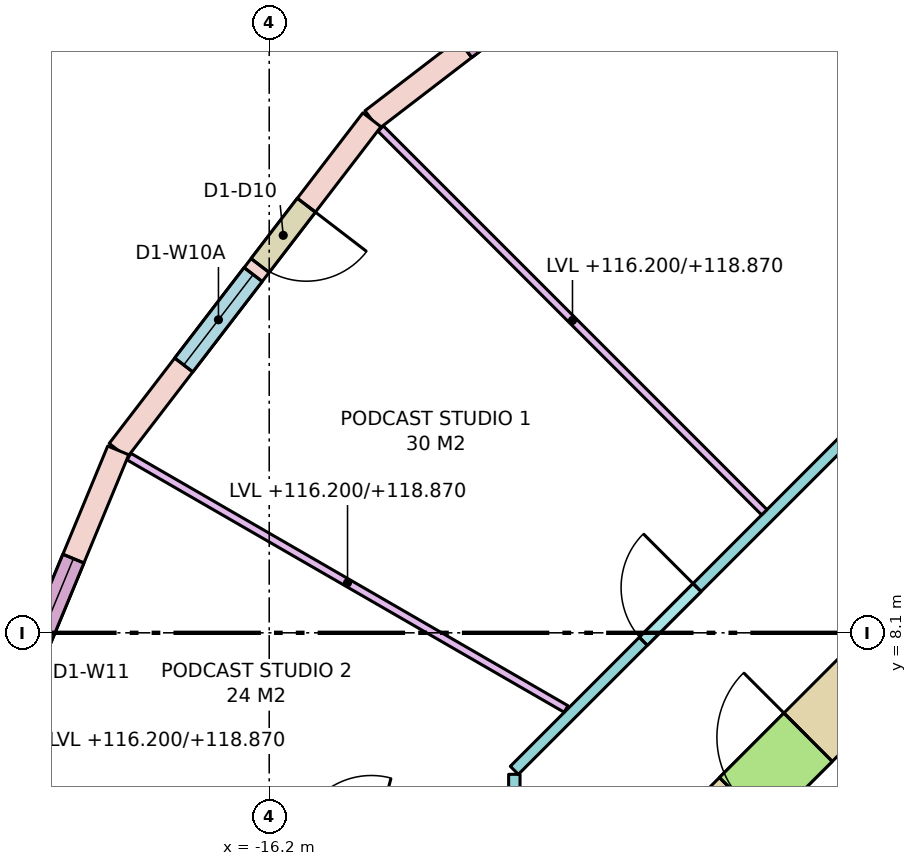
"""IFC4 building model, lengths in metres.
Left out: names, types, materials, properties, quantities, classifications, styles, units other than length and angle.
Written with IfcOpenShell. Run it as: python <this file> out.ifc"""

import sys

from ifc_helpers import new_model, si_unit, direction, frame, frame_2d, origin, place, context, subcontext, project, spatial, rectangle, extrude, element, fill, save


model = new_model("IFC4")
c1 = context("Model", 3, precision=1e-05, world=origin(), true_north=direction((0.0, 1.0)))
c2 = subcontext(c1, "Body", "Model", "MODEL_VIEW")
j1 = project(units=[si_unit("LENGTHUNIT", "METRE"), si_unit("PLANEANGLEUNIT", "RADIAN")], contexts=[c1])
p1 = place(None, origin())
s1 = spatial("IfcSite", under=j1, at=p1, CompositionType="ELEMENT")
p2 = place(p1, origin())
s2 = spatial("IfcBuilding", under=s1, at=p2, CompositionType="ELEMENT")
p3 = place(p2, frame((0.0, 0.0, 116.2)))
s3 = spatial("IfcBuildingStorey", under=s2, at=p3, CompositionType="ELEMENT", Elevation=116.2)
p4 = place(p3, frame((-10.418, 5.418, -0.28), z_axis=(0.0, 0.0, 1.0), x_axis=(0.707106781187, 0.707106781187, 0.0)))
e1 = element("IfcWall", 1, at=p4, inside=s3, PredefinedType="SHEAR", context=c2, shape_type="SweptSolid", body=[
    extrude(rectangle(XDim=4.243, YDim=0.9, at=frame_2d((2.121, 0.0))), origin(), (0.0, 0.0, 1.0), 3.8),
])
p5 = place(p4, frame((0.65, 0.0, 0.28)))
e2 = element("IfcOpeningElement", 2, at=p5, cuts=e1, PredefinedType="OPENING", context=c2, shape_type="SweptSolid", body=[
    extrude(rectangle(XDim=1.2, YDim=2.1, at=frame_2d((0.6, 1.05))), frame((0.0, 0.46, 0.0), z_axis=(0.0, -1.0, 0.0), x_axis=(1.0, 0.0, 0.0)), (0.0, 0.0, 1.0), 0.92),
])
p6 = place(p3, frame((-10.5, 18.187, 0.0), z_axis=(0.0, 0.0, 1.0), x_axis=(-0.793335336593, -0.608784891166, 0.0)))
e3 = element("IfcWall", 3, at=p6, inside=s3, PredefinedType="STANDARD", context=c2, shape_type="SweptSolid", body=[
    extrude(rectangle(XDim=5.482, YDim=0.3, at=frame_2d((2.741, 0.0))), origin(), (0.0, 0.0, 1.0), 3.52),
])
p7 = place(p6, frame((1.541, 0.0, 0.8)))
e4 = element("IfcOpeningElement", 4, at=p7, cuts=e3, PredefinedType="OPENING", context=c2, shape_type="SweptSolid", body=[
    extrude(rectangle(XDim=2.4, YDim=2.5, at=frame_2d((1.2, 1.25))), frame((0.0, 0.16, 0.0), z_axis=(0.0, -1.0, 0.0), x_axis=(1.0, 0.0, 0.0)), (0.0, 0.0, 1.0), 0.32),
])
p8 = place(p3, frame((-14.849, 14.849, 0.0), z_axis=(0.0, 0.0, 1.0), x_axis=(-0.608784891166, -0.793335336593, 0.0)))
e5 = element("IfcWall", 5, at=p8, inside=s3, PredefinedType="STANDARD", context=c2, shape_type="SweptSolid", body=[
    extrude(rectangle(XDim=5.482, YDim=0.3, at=frame_2d((2.741, 0.0))), origin(), (0.0, 0.0, 1.0), 3.52),
])
p9 = place(p8, frame((1.416, 0.0, 0.0)))
e6 = element("IfcOpeningElement", 6, at=p9, cuts=e5, PredefinedType="OPENING", context=c2, shape_type="SweptSolid", body=[
    extrude(rectangle(XDim=1.0, YDim=2.4, at=frame_2d((0.5, 1.2))), frame((0.0, 0.16, 0.0), z_axis=(0.0, -1.0, 0.0), x_axis=(1.0, 0.0, 0.0)), (0.0, 0.0, 1.0), 0.32),
])
p10 = place(p8, frame((2.566, 0.0, 0.8)))
e7 = element("IfcOpeningElement", 7, at=p10, cuts=e5, PredefinedType="OPENING", context=c2, shape_type="SweptSolid", body=[
    extrude(rectangle(XDim=1.5, YDim=2.5, at=frame_2d((0.75, 1.25))), frame((0.0, 0.16, 0.0), z_axis=(0.0, -1.0, 0.0), x_axis=(1.0, 0.0, 0.0)), (0.0, 0.0, 1.0), 0.32),
])
p11 = place(p3, frame((-18.187, 10.5, 0.0), z_axis=(0.0, 0.0, 1.0), x_axis=(-0.382688740813, -0.923877333662, 0.0)))
e8 = element("IfcWall", 8, at=p11, inside=s3, PredefinedType="STANDARD", context=c2, shape_type="SweptSolid", body=[
    extrude(rectangle(XDim=5.482, YDim=0.3, at=frame_2d((2.741, 0.0))), origin(), (0.0, 0.0, 1.0), 3.52),
])
p12 = place(p11, frame((1.541, 0.0, 0.8)))
e9 = element("IfcOpeningElement", 9, at=p12, cuts=e8, PredefinedType="OPENING", context=c2, shape_type="SweptSolid", body=[
    extrude(rectangle(XDim=2.4, YDim=2.5, at=frame_2d((1.2, 1.25))), frame((0.0, 0.16, 0.0), z_axis=(0.0, -1.0, 0.0), x_axis=(1.0, 0.0, 0.0)), (0.0, 0.0, 1.0), 0.32),
])
p13 = place(p3, frame((-12.975, 4.816, 0.0), z_axis=(0.0, 0.0, 1.0), x_axis=(0.0, 1.0, 0.0)))
e10 = element("IfcWall", 10, at=p13, inside=s3, PredefinedType="PARTITIONING", context=c2, shape_type="SweptSolid", body=[
    extrude(rectangle(XDim=1.422, YDim=0.15, at=frame_2d((0.711, 0.0))), origin(), (0.0, 0.0, 1.0), 3.52),
])
p14 = place(p3, frame((-12.975, 6.291, 0.0), z_axis=(0.0, 0.0, 1.0), x_axis=(0.707125355289, 0.707088206597, 0.0)))
e11 = element("IfcWall", 11, at=p14, inside=s3, PredefinedType="PARTITIONING", context=c2, shape_type="SweptSolid", body=[
    extrude(rectangle(XDim=6.572, YDim=0.15, at=frame_2d((3.286, 0.0))), origin(), (0.0, 0.0, 1.0), 2.67),
])
p15 = place(p14, frame((2.4, 0.0, 0.0)))
e12 = element("IfcOpeningElement", 12, at=p15, cuts=e11, PredefinedType="OPENING", context=c2, shape_type="SweptSolid", body=[
    extrude(rectangle(XDim=1.0, YDim=2.1, at=frame_2d((0.5, 1.05))), frame((0.0, 0.085, 0.0), z_axis=(0.0, -1.0, 0.0), x_axis=(1.0, 0.0, 0.0)), (0.0, 0.0, 1.0), 0.17),
])
p16 = place(p3, frame((-9.686, 9.686, 0.0), z_axis=(0.0, 0.0, 1.0), x_axis=(-0.707106781187, 0.707106781187, 0.0)))
e13 = element("IfcWall", 13, at=p16, inside=s3, PredefinedType="PARTITIONING", context=c2, shape_type="SweptSolid", body=[
    extrude(rectangle(XDim=7.139, YDim=0.1, at=frame_2d((3.569, 0.0))), origin(), (0.0, 0.0, 1.0), 2.67),
])
p17 = place(p3, frame((-12.294, 7.098, 0.0), z_axis=(0.0, 0.0, 1.0), x_axis=(-0.866010486135, 0.500025837236, 0.0)))
e14 = element("IfcWall", 14, at=p17, inside=s3, PredefinedType="PARTITIONING", context=c2, shape_type="SweptSolid", body=[
    extrude(rectangle(XDim=6.641, YDim=0.1, at=frame_2d((3.32, 0.0))), origin(), (0.0, 0.0, 1.0), 2.67),
])
p18 = place(p9, origin())
e15 = element("IfcDoor", 15, at=p18, inside=s3, OperationType="SINGLE_SWING_LEFT", PredefinedType="DOOR", context=c2, shape_type="SweptSolid", body=[
    extrude(rectangle(XDim=1.0, YDim=2.4, at=frame_2d((0.5, 1.2))), frame((0.0, 0.025, 0.0), z_axis=(0.0, -1.0, 0.0), x_axis=(1.0, 0.0, 0.0)), (0.0, 0.0, 1.0), 0.05),
])
fill(e6, e15)
p19 = place(p10, origin())
e16 = element("IfcWindow", 16, at=p19, inside=s3, PartitioningType="SINGLE_PANEL", PredefinedType="WINDOW", context=c2, shape_type="SweptSolid", body=[
    extrude(rectangle(XDim=1.5, YDim=2.5, at=frame_2d((0.75, 1.25))), frame((0.0, 0.03, 0.0), z_axis=(0.0, -1.0, 0.0), x_axis=(1.0, 0.0, 0.0)), (0.0, 0.0, 1.0), 0.06),
])
fill(e7, e16)
p20 = place(p12, origin())
e17 = element("IfcWindow", 17, at=p20, inside=s3, PartitioningType="SINGLE_PANEL", PredefinedType="WINDOW", context=c2, shape_type="SweptSolid", body=[
    extrude(rectangle(XDim=2.4, YDim=2.5, at=frame_2d((1.2, 1.25))), frame((0.0, 0.03, 0.0), z_axis=(0.0, -1.0, 0.0), x_axis=(1.0, 0.0, 0.0)), (0.0, 0.0, 1.0), 0.06),
])
fill(e9, e17)
p21 = place(p5, origin())
e18 = element("IfcDoor", 18, at=p21, inside=s3, OperationType="SINGLE_SWING_RIGHT", PredefinedType="DOOR", context=c2, shape_type="SweptSolid", body=[
    extrude(rectangle(XDim=1.2, YDim=2.1, at=frame_2d((0.6, 1.05))), frame((0.0, 0.025, 0.0), z_axis=(0.0, -1.0, 0.0), x_axis=(1.0, 0.0, 0.0)), (0.0, 0.0, 1.0), 0.05),
])
fill(e2, e18)
p22 = place(p15, origin())
e19 = element("IfcDoor", 19, at=p22, inside=s3, OperationType="SINGLE_SWING_RIGHT", PredefinedType="DOOR", context=c2, shape_type="SweptSolid", body=[
    extrude(rectangle(XDim=1.0, YDim=2.1, at=frame_2d((0.5, 1.05))), frame((0.0, 0.025, 0.0), z_axis=(0.0, -1.0, 0.0), x_axis=(1.0, 0.0, 0.0)), (0.0, 0.0, 1.0), 0.05),
])
fill(e12, e19)
save(model, sys.argv[1])
